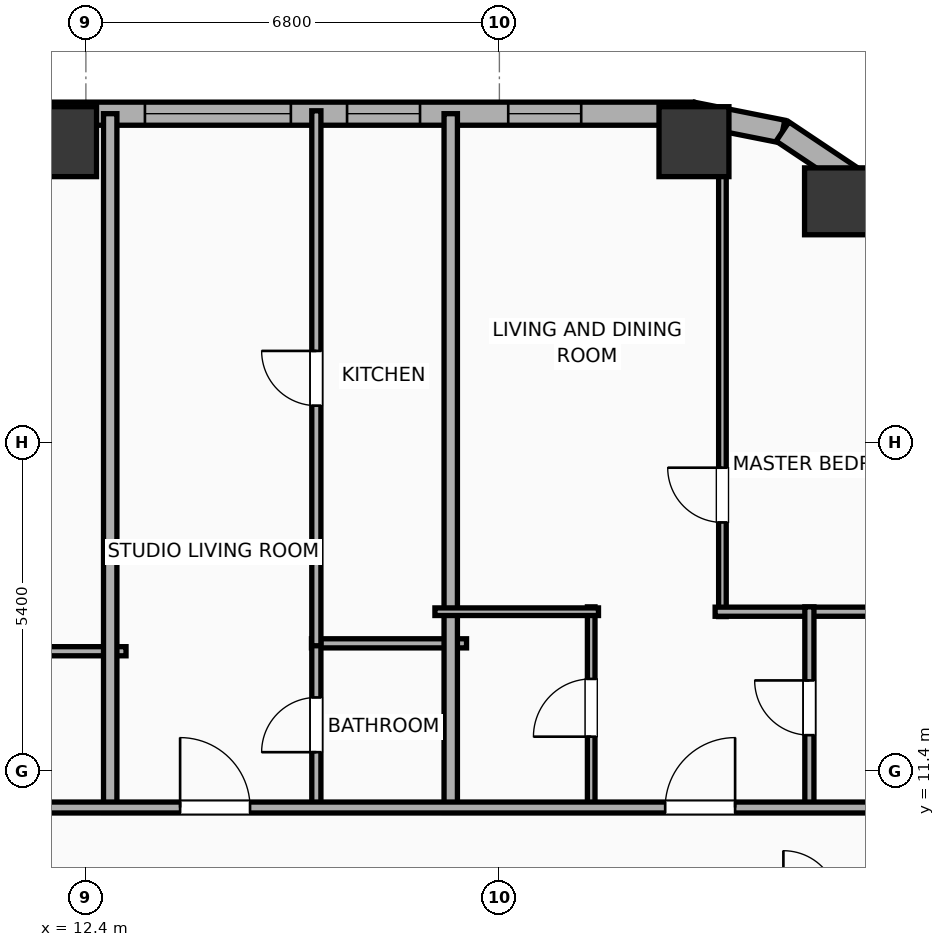
"""IFC4 building model, lengths in metres.
Left out: names, types, materials, properties, quantities, classifications, styles, units other than length and angle.
Written with IfcOpenShell. Run it as: python <this file> out.ifc"""

import sys

from ifc_helpers import new_model, si_unit, direction, frame, frame_2d, origin, origin_2d, place, context, subcontext, project, spatial, rectangle, hollow_rectangle, hollow_circle, extrude, element, fill, save


model = new_model("IFC4")
c1 = context("Model", 3, precision=1e-05, world=origin(), true_north=direction((0.0, 1.0)))
c2 = subcontext(c1, "Body", "Model", "MODEL_VIEW")
j1 = project(units=[si_unit("LENGTHUNIT", "METRE"), si_unit("PLANEANGLEUNIT", "RADIAN")], contexts=[c1])
p1 = place(None, origin())
s1 = spatial("IfcSite", under=j1, at=p1, CompositionType="ELEMENT")
p2 = place(p1, origin())
s2 = spatial("IfcBuilding", under=s1, at=p2, CompositionType="ELEMENT")
p3 = place(p2, frame((0.0, 0.0, 29.9)))
s3 = spatial("IfcBuildingStorey", under=s2, at=p3, CompositionType="ELEMENT", Elevation=29.9)
p4 = place(p3, frame((24.769, 20.769, 0.0), z_axis=(0.0, 0.0, 1.0), x_axis=(1.0, 0.0, 0.0)))
e1 = element("IfcColumn", 1, at=p4, inside=s3, PredefinedType="COLUMN", context=c2, shape_type="SweptSolid", body=[
    extrude(hollow_circle(Radius=0.55, WallThickness=0.036, at=origin_2d()), origin(), (0.0, 0.0, 1.0), 3.9),
])
for number, where, z_axis, x_axis in (
    (2, (22.4, 21.75, 0.0), (0.0, 0.0, 1.0), (1.0, 0.0, 0.0)),
    (3, (12.0, 21.75, 0.0), (0.0, 0.0, 1.0), (1.0, 0.0, 0.0)),
):
    element("IfcColumn", number, at=place(p3, frame(where, z_axis=z_axis, x_axis=x_axis)), inside=s3, PredefinedType="COLUMN", context=c2, shape_type="SweptSolid", body=[
        extrude(hollow_rectangle(XDim=1.15, YDim=1.15, WallThickness=0.04, at=origin_2d()), origin(), (0.0, 0.0, 1.0), 3.9),
    ])
p5 = place(p3, frame((-29.581, 22.21, 0.0), z_axis=(0.0, 0.0, 1.0), x_axis=(1.0, 0.0, 0.0)))
e4 = element("IfcWall", 4, at=p5, inside=s3, PredefinedType="ELEMENTEDWALL", context=c2, shape_type="SweptSolid", body=[
    extrude(rectangle(XDim=51.963, YDim=0.38, at=frame_2d((25.981, 0.0))), origin(), (0.0, 0.0, 1.0), 2.54),
])
p6 = place(p5, frame((5.81, 0.0, 0.75)))
e5 = element("IfcOpeningElement", 5, at=p6, cuts=e4, PredefinedType="OPENING", context=c2, shape_type="SweptSolid", body=[
    extrude(rectangle(XDim=2.4, YDim=1.63, at=frame_2d((1.2, 0.815))), frame((0.0, 0.2, 0.0), z_axis=(0.0, -1.0, 0.0), x_axis=(1.0, 0.0, 0.0)), (0.0, 0.0, 1.0), 0.4),
])
p7 = place(p5, frame((42.952, 0.0, 0.75)))
e6 = element("IfcOpeningElement", 6, at=p7, cuts=e4, PredefinedType="OPENING", context=c2, shape_type="SweptSolid", body=[
    extrude(rectangle(XDim=2.4, YDim=1.63, at=frame_2d((1.2, 0.815))), frame((0.0, 0.2, 0.0), z_axis=(0.0, -1.0, 0.0), x_axis=(1.0, 0.0, 0.0)), (0.0, 0.0, 1.0), 0.4),
])
p8 = place(p5, frame((1.436, 0.0, 0.75)))
e7 = element("IfcOpeningElement", 7, at=p8, cuts=e4, PredefinedType="OPENING", context=c2, shape_type="SweptSolid", body=[
    extrude(rectangle(XDim=1.2, YDim=1.63, at=frame_2d((0.6, 0.815))), frame((0.0, 0.2, 0.0), z_axis=(0.0, -1.0, 0.0), x_axis=(1.0, 0.0, 0.0)), (0.0, 0.0, 1.0), 0.4),
])
p9 = place(p5, frame((3.686, 0.0, 0.75)))
e8 = element("IfcOpeningElement", 8, at=p9, cuts=e4, PredefinedType="OPENING", context=c2, shape_type="SweptSolid", body=[
    extrude(rectangle(XDim=1.2, YDim=1.63, at=frame_2d((0.6, 0.815))), frame((0.0, 0.2, 0.0), z_axis=(0.0, -1.0, 0.0), x_axis=(1.0, 0.0, 0.0)), (0.0, 0.0, 1.0), 0.4),
])
p10 = place(p5, frame((11.221, 0.0, 0.75)))
e9 = element("IfcOpeningElement", 9, at=p10, cuts=e4, PredefinedType="OPENING", context=c2, shape_type="SweptSolid", body=[
    extrude(rectangle(XDim=1.2, YDim=1.63, at=frame_2d((0.6, 0.815))), frame((0.0, 0.2, 0.0), z_axis=(0.0, -1.0, 0.0), x_axis=(1.0, 0.0, 0.0)), (0.0, 0.0, 1.0), 0.4),
])
p11 = place(p5, frame((17.686, 0.0, 0.75)))
e10 = element("IfcOpeningElement", 10, at=p11, cuts=e4, PredefinedType="OPENING", context=c2, shape_type="SweptSolid", body=[
    extrude(rectangle(XDim=1.2, YDim=1.63, at=frame_2d((0.6, 0.815))), frame((0.0, 0.2, 0.0), z_axis=(0.0, -1.0, 0.0), x_axis=(1.0, 0.0, 0.0)), (0.0, 0.0, 1.0), 0.4),
])
p12 = place(p5, frame((14.886, 0.0, 0.75)))
e11 = element("IfcOpeningElement", 11, at=p12, cuts=e4, PredefinedType="OPENING", context=c2, shape_type="SweptSolid", body=[
    extrude(rectangle(XDim=1.2, YDim=1.63, at=frame_2d((0.6, 0.815))), frame((0.0, 0.2, 0.0), z_axis=(0.0, -1.0, 0.0), x_axis=(1.0, 0.0, 0.0)), (0.0, 0.0, 1.0), 0.4),
])
p13 = place(p5, frame((22.181, 0.0, 0.75)))
e12 = element("IfcOpeningElement", 12, at=p13, cuts=e4, PredefinedType="OPENING", context=c2, shape_type="SweptSolid", body=[
    extrude(rectangle(XDim=1.2, YDim=1.63, at=frame_2d((0.6, 0.815))), frame((0.0, 0.2, 0.0), z_axis=(0.0, -1.0, 0.0), x_axis=(1.0, 0.0, 0.0)), (0.0, 0.0, 1.0), 0.4),
])
p14 = place(p5, frame((28.926, 0.0, 0.75)))
e13 = element("IfcOpeningElement", 13, at=p14, cuts=e4, PredefinedType="OPENING", context=c2, shape_type="SweptSolid", body=[
    extrude(rectangle(XDim=1.2, YDim=1.63, at=frame_2d((0.6, 0.815))), frame((0.0, 0.2, 0.0), z_axis=(0.0, -1.0, 0.0), x_axis=(1.0, 0.0, 0.0)), (0.0, 0.0, 1.0), 0.4),
])
p15 = place(p5, frame((26.126, 0.0, 0.75)))
e14 = element("IfcOpeningElement", 14, at=p15, cuts=e4, PredefinedType="OPENING", context=c2, shape_type="SweptSolid", body=[
    extrude(rectangle(XDim=1.2, YDim=1.63, at=frame_2d((0.6, 0.815))), frame((0.0, 0.2, 0.0), z_axis=(0.0, -1.0, 0.0), x_axis=(1.0, 0.0, 0.0)), (0.0, 0.0, 1.0), 0.4),
])
p16 = place(p5, frame((32.276, 0.0, 0.75)))
e15 = element("IfcOpeningElement", 15, at=p16, cuts=e4, PredefinedType="OPENING", context=c2, shape_type="SweptSolid", body=[
    extrude(rectangle(XDim=1.2, YDim=1.63, at=frame_2d((0.6, 0.815))), frame((0.0, 0.2, 0.0), z_axis=(0.0, -1.0, 0.0), x_axis=(1.0, 0.0, 0.0)), (0.0, 0.0, 1.0), 0.4),
])
p17 = place(p5, frame((35.076, 0.0, 0.75)))
e16 = element("IfcOpeningElement", 16, at=p17, cuts=e4, PredefinedType="OPENING", context=c2, shape_type="SweptSolid", body=[
    extrude(rectangle(XDim=1.2, YDim=1.63, at=frame_2d((0.6, 0.815))), frame((0.0, 0.2, 0.0), z_axis=(0.0, -1.0, 0.0), x_axis=(1.0, 0.0, 0.0)), (0.0, 0.0, 1.0), 0.4),
])
p18 = place(p5, frame((38.981, 0.0, 0.75)))
e17 = element("IfcOpeningElement", 17, at=p18, cuts=e4, PredefinedType="OPENING", context=c2, shape_type="SweptSolid", body=[
    extrude(rectangle(XDim=1.2, YDim=1.63, at=frame_2d((0.6, 0.815))), frame((0.0, 0.2, 0.0), z_axis=(0.0, -1.0, 0.0), x_axis=(1.0, 0.0, 0.0)), (0.0, 0.0, 1.0), 0.4),
])
p19 = place(p5, frame((46.276, 0.0, 0.75)))
e18 = element("IfcOpeningElement", 18, at=p19, cuts=e4, PredefinedType="OPENING", context=c2, shape_type="SweptSolid", body=[
    extrude(rectangle(XDim=1.2, YDim=1.63, at=frame_2d((0.6, 0.815))), frame((0.0, 0.2, 0.0), z_axis=(0.0, -1.0, 0.0), x_axis=(1.0, 0.0, 0.0)), (0.0, 0.0, 1.0), 0.4),
])
p20 = place(p5, frame((48.927, 0.0, 0.75)))
e19 = element("IfcOpeningElement", 19, at=p20, cuts=e4, PredefinedType="OPENING", context=c2, shape_type="SweptSolid", body=[
    extrude(rectangle(XDim=1.2, YDim=1.63, at=frame_2d((0.6, 0.815))), frame((0.0, 0.2, 0.0), z_axis=(0.0, -1.0, 0.0), x_axis=(1.0, 0.0, 0.0)), (0.0, 0.0, 1.0), 0.4),
])
p21 = place(p3, frame((22.381, 22.21, 0.0), z_axis=(0.0, 0.0, 1.0), x_axis=(0.980786132421, -0.195086038585, 0.0)))
e20 = element("IfcWall", 20, at=p21, inside=s3, PredefinedType="ELEMENTEDWALL", context=c2, shape_type="SweptSolid", body=[
    extrude(rectangle(XDim=1.504, YDim=0.38, at=frame_2d((0.752, 0.0))), origin(), (0.0, 0.0, 1.0), 2.54),
])
p22 = place(p3, frame((23.857, 21.917, 0.0), z_axis=(0.0, 0.0, 1.0), x_axis=(0.831392092774, -0.555686231674, 0.0)))
e21 = element("IfcWall", 21, at=p22, inside=s3, PredefinedType="ELEMENTEDWALL", context=c2, shape_type="SweptSolid", body=[
    extrude(rectangle(XDim=1.485, YDim=0.38, at=frame_2d((0.743, 0.0))), origin(), (0.0, 0.0, 1.0), 2.54),
])
p23 = place(p3, frame((25.091, 21.091, 0.0), z_axis=(0.0, 0.0, 1.0), x_axis=(0.555686231674, -0.831392092774, 0.0)))
e22 = element("IfcWall", 22, at=p23, inside=s3, PredefinedType="ELEMENTEDWALL", context=c2, shape_type="SweptSolid", body=[
    extrude(rectangle(XDim=1.485, YDim=0.38, at=frame_2d((0.743, 0.0))), origin(), (0.0, 0.0, 1.0), 3.65),
])
p24 = place(p3, frame((10.817, 13.37, 0.0), z_axis=(0.0, 0.0, 1.0), x_axis=(1.0, 0.0, 0.0)))
e23 = element("IfcWall", 23, at=p24, inside=s3, PredefinedType="PLUMBINGWALL", context=c2, shape_type="SweptSolid", body=[
    extrude(rectangle(XDim=2.243, YDim=0.15, at=frame_2d((1.122, 0.0))), origin(), (0.0, 0.0, 1.0), 3.65),
])
p25 = place(p3, frame((12.8, 10.72, 0.0), z_axis=(0.0, 0.0, 1.0), x_axis=(0.0, 1.0, 0.0)))
e24 = element("IfcWall", 24, at=p25, inside=s3, PredefinedType="PARTITIONING", context=c2, shape_type="SweptSolid", body=[
    extrude(rectangle(XDim=11.49, YDim=0.22, at=frame_2d((5.745, 0.0))), origin(), (0.0, 0.0, 1.0), 2.54),
])
p26 = place(p3, frame((16.11, 13.5, 0.0), z_axis=(0.0, 0.0, 1.0), x_axis=(1.0, 0.0, 0.0)))
e25 = element("IfcWall", 25, at=p26, inside=s3, PredefinedType="PLUMBINGWALL", context=c2, shape_type="SweptSolid", body=[
    extrude(rectangle(XDim=2.55, YDim=0.15, at=frame_2d((1.275, 0.0))), origin(), (0.0, 0.0, 1.0), 3.65),
])
p27 = place(p3, frame((16.19, 10.78, 0.0), z_axis=(0.0, 0.0, 1.0), x_axis=(0.0, 1.0, 0.0)))
e26 = element("IfcWall", 26, at=p27, inside=s3, PredefinedType="PLUMBINGWALL", context=c2, shape_type="SweptSolid", body=[
    extrude(rectangle(XDim=2.76, YDim=0.15, at=frame_2d((1.38, 0.0))), origin(), (0.0, 0.0, 1.0), 3.65),
])
p28 = place(p27, frame((0.93, 0.0, 0.0)))
e27 = element("IfcOpeningElement", 27, at=p28, cuts=e26, PredefinedType="OPENING", context=c2, shape_type="SweptSolid", body=[
    extrude(rectangle(XDim=0.9, YDim=2.05, at=frame_2d((0.45, 1.025))), frame((0.0, 0.085, 0.0), z_axis=(0.0, -1.0, 0.0), x_axis=(1.0, 0.0, 0.0)), (0.0, 0.0, 1.0), 0.17),
])
p29 = place(p3, frame((16.19, 13.46, 0.0), z_axis=(0.0, 0.0, 1.0), x_axis=(0.0, 1.0, 0.0)))
e28 = element("IfcWall", 28, at=p29, inside=s3, PredefinedType="PLUMBINGWALL", context=c2, shape_type="SweptSolid", body=[
    extrude(rectangle(XDim=8.798, YDim=0.15, at=frame_2d((4.399, 0.0))), origin(), (0.0, 0.0, 1.0), 3.65),
])
p30 = place(p29, frame((3.949, 0.0, 0.0)))
e29 = element("IfcOpeningElement", 29, at=p30, cuts=e28, PredefinedType="OPENING", context=c2, shape_type="SweptSolid", body=[
    extrude(rectangle(XDim=0.9, YDim=2.05, at=frame_2d((0.45, 1.025))), frame((0.0, 0.085, 0.0), z_axis=(0.0, -1.0, 0.0), x_axis=(1.0, 0.0, 0.0)), (0.0, 0.0, 1.0), 0.17),
])
p31 = place(p3, frame((18.4, 10.72, 0.0), z_axis=(0.0, 0.0, 1.0), x_axis=(0.0, 1.0, 0.0)))
e30 = element("IfcWall", 30, at=p31, inside=s3, PredefinedType="PARTITIONING", context=c2, shape_type="SweptSolid", body=[
    extrude(rectangle(XDim=11.49, YDim=0.22, at=frame_2d((5.745, 0.0))), origin(), (0.0, 0.0, 1.0), 3.65),
])
p32 = place(p3, frame((22.868, 13.94, 0.0), z_axis=(0.0, 0.0, 1.0), x_axis=(0.0, 1.0, 0.0)))
e31 = element("IfcWall", 31, at=p32, inside=s3, PredefinedType="PARTITIONING", context=c2, shape_type="SweptSolid", body=[
    extrude(rectangle(XDim=8.326, YDim=0.125, at=frame_2d((4.163, 0.0))), origin(), (0.0, 0.0, 1.0), 2.54),
])
p33 = place(p32, frame((1.548, 0.0, 0.0)))
e32 = element("IfcOpeningElement", 32, at=p33, cuts=e31, PredefinedType="OPENING", context=c2, shape_type="SweptSolid", body=[
    extrude(rectangle(XDim=0.9, YDim=2.05, at=frame_2d((0.45, 1.025))), frame((0.0, 0.073, 0.0), z_axis=(0.0, -1.0, 0.0), x_axis=(1.0, 0.0, 0.0)), (0.0, 0.0, 1.0), 0.145),
])
p34 = place(p3, frame((22.748, 14.02, 0.0), z_axis=(0.0, 0.0, 1.0), x_axis=(1.0, 0.0, 0.0)))
e33 = element("IfcWall", 33, at=p34, inside=s3, PredefinedType="PLUMBINGWALL", context=c2, shape_type="SweptSolid", body=[
    extrude(rectangle(XDim=3.612, YDim=0.15, at=frame_2d((1.806, 0.0))), origin(), (0.0, 0.0, 1.0), 3.65),
])
p35 = place(p3, frame((20.71, 10.78, 0.0), z_axis=(0.0, 0.0, 1.0), x_axis=(0.0, 1.0, 0.0)))
e34 = element("IfcWall", 34, at=p35, inside=s3, PredefinedType="PARTITIONING", context=c2, shape_type="SweptSolid", body=[
    extrude(rectangle(XDim=3.32, YDim=0.125, at=frame_2d((1.66, 0.0))), origin(), (0.0, 0.0, 1.0), 2.54),
])
p36 = place(p35, frame((1.185, 0.0, 0.0)))
e35 = element("IfcOpeningElement", 35, at=p36, cuts=e34, PredefinedType="OPENING", context=c2, shape_type="SweptSolid", body=[
    extrude(rectangle(XDim=0.95, YDim=2.05, at=frame_2d((0.475, 1.025))), frame((0.0, 0.073, 0.0), z_axis=(0.0, -1.0, 0.0), x_axis=(1.0, 0.0, 0.0)), (0.0, 0.0, 1.0), 0.145),
])
p37 = place(p3, frame((18.14, 14.02, 0.0), z_axis=(0.0, 0.0, 1.0), x_axis=(1.0, 0.0, 0.0)))
e36 = element("IfcWall", 36, at=p37, inside=s3, PredefinedType="PARTITIONING", context=c2, shape_type="SweptSolid", body=[
    extrude(rectangle(XDim=2.69, YDim=0.125, at=frame_2d((1.345, 0.0))), origin(), (0.0, 0.0, 1.0), 3.65),
])
p38 = place(p3, frame((24.298, 10.78, 0.0), z_axis=(0.0, 0.0, 1.0), x_axis=(0.0, 1.0, 0.0)))
e37 = element("IfcWall", 37, at=p38, inside=s3, PredefinedType="PLUMBINGWALL", context=c2, shape_type="SweptSolid", body=[
    extrude(rectangle(XDim=3.32, YDim=0.15, at=frame_2d((1.66, 0.0))), origin(), (0.0, 0.0, 1.0), 3.65),
])
p39 = place(p38, frame((1.21, 0.0, 0.0)))
e38 = element("IfcOpeningElement", 38, at=p39, cuts=e37, PredefinedType="OPENING", context=c2, shape_type="SweptSolid", body=[
    extrude(rectangle(XDim=0.9, YDim=2.05, at=frame_2d((0.45, 1.025))), frame((0.0, 0.085, 0.0), z_axis=(0.0, -1.0, 0.0), x_axis=(1.0, 0.0, 0.0)), (0.0, 0.0, 1.0), 0.17),
])
p40 = place(p3, frame((-33.41, 10.8, 0.0), z_axis=(0.0, 0.0, 1.0), x_axis=(1.0, 0.0, 0.0)))
e39 = element("IfcWall", 39, at=p40, inside=s3, PredefinedType="PARTITIONING", context=c2, shape_type="SweptSolid", body=[
    extrude(rectangle(XDim=59.62, YDim=0.18, at=frame_2d((29.81, 0.0))), origin(), (0.0, 0.0, 1.0), 3.65),
])
p41 = place(p40, frame((3.062, 0.0, 0.0)))
e40 = element("IfcOpeningElement", 40, at=p41, cuts=e39, PredefinedType="OPENING", context=c2, shape_type="SweptSolid", body=[
    extrude(rectangle(XDim=1.15, YDim=2.05, at=frame_2d((0.575, 1.025))), frame((0.0, 0.1, 0.0), z_axis=(0.0, -1.0, 0.0), x_axis=(1.0, 0.0, 0.0)), (0.0, 0.0, 1.0), 0.2),
])
p42 = place(p40, frame((10.312, 0.0, 0.0)))
e41 = element("IfcOpeningElement", 41, at=p42, cuts=e39, PredefinedType="OPENING", context=c2, shape_type="SweptSolid", body=[
    extrude(rectangle(XDim=1.15, YDim=2.05, at=frame_2d((0.575, 1.025))), frame((0.0, 0.1, 0.0), z_axis=(0.0, -1.0, 0.0), x_axis=(1.0, 0.0, 0.0)), (0.0, 0.0, 1.0), 0.2),
])
p43 = place(p40, frame((15.153, 0.0, 0.0)))
e42 = element("IfcOpeningElement", 42, at=p43, cuts=e39, PredefinedType="OPENING", context=c2, shape_type="SweptSolid", body=[
    extrude(rectangle(XDim=0.9, YDim=2.05, at=frame_2d((0.45, 1.025))), frame((0.0, 0.1, 0.0), z_axis=(0.0, -1.0, 0.0), x_axis=(1.0, 0.0, 0.0)), (0.0, 0.0, 1.0), 0.2),
])
p44 = place(p40, frame((21.508, 0.0, 0.0)))
e43 = element("IfcOpeningElement", 43, at=p44, cuts=e39, PredefinedType="OPENING", context=c2, shape_type="SweptSolid", body=[
    extrude(rectangle(XDim=1.15, YDim=2.05, at=frame_2d((0.575, 1.025))), frame((0.0, 0.1, 0.0), z_axis=(0.0, -1.0, 0.0), x_axis=(1.0, 0.0, 0.0)), (0.0, 0.0, 1.0), 0.2),
])
p45 = place(p40, frame((26.355, 0.0, 0.0)))
e44 = element("IfcOpeningElement", 44, at=p45, cuts=e39, PredefinedType="OPENING", context=c2, shape_type="SweptSolid", body=[
    extrude(rectangle(XDim=0.9, YDim=2.05, at=frame_2d((0.45, 1.025))), frame((0.0, 0.1, 0.0), z_axis=(0.0, -1.0, 0.0), x_axis=(1.0, 0.0, 0.0)), (0.0, 0.0, 1.0), 0.2),
])
p46 = place(p40, frame((32.753, 0.0, 0.0)))
e45 = element("IfcOpeningElement", 45, at=p46, cuts=e39, PredefinedType="OPENING", context=c2, shape_type="SweptSolid", body=[
    extrude(rectangle(XDim=1.15, YDim=2.05, at=frame_2d((0.575, 1.025))), frame((0.0, 0.1, 0.0), z_axis=(0.0, -1.0, 0.0), x_axis=(1.0, 0.0, 0.0)), (0.0, 0.0, 1.0), 0.2),
])
p47 = place(p40, frame((36.163, 0.0, 0.0)))
e46 = element("IfcOpeningElement", 46, at=p47, cuts=e39, PredefinedType="OPENING", context=c2, shape_type="SweptSolid", body=[
    extrude(rectangle(XDim=1.15, YDim=2.05, at=frame_2d((0.575, 1.025))), frame((0.0, 0.1, 0.0), z_axis=(0.0, -1.0, 0.0), x_axis=(1.0, 0.0, 0.0)), (0.0, 0.0, 1.0), 0.2),
])
p48 = place(p40, frame((43.156, 0.0, 0.0)))
e47 = element("IfcOpeningElement", 47, at=p48, cuts=e39, PredefinedType="OPENING", context=c2, shape_type="SweptSolid", body=[
    extrude(rectangle(XDim=0.9, YDim=2.05, at=frame_2d((0.45, 1.025))), frame((0.0, 0.1, 0.0), z_axis=(0.0, -1.0, 0.0), x_axis=(1.0, 0.0, 0.0)), (0.0, 0.0, 1.0), 0.2),
])
p49 = place(p40, frame((47.36, 0.0, 0.0)))
e48 = element("IfcOpeningElement", 48, at=p49, cuts=e39, PredefinedType="OPENING", context=c2, shape_type="SweptSolid", body=[
    extrude(rectangle(XDim=1.15, YDim=2.05, at=frame_2d((0.575, 1.025))), frame((0.0, 0.1, 0.0), z_axis=(0.0, -1.0, 0.0), x_axis=(1.0, 0.0, 0.0)), (0.0, 0.0, 1.0), 0.2),
])
p50 = place(p40, frame((55.337, 0.0, 0.0)))
e49 = element("IfcOpeningElement", 49, at=p50, cuts=e39, PredefinedType="OPENING", context=c2, shape_type="SweptSolid", body=[
    extrude(rectangle(XDim=1.15, YDim=2.05, at=frame_2d((0.575, 1.025))), frame((0.0, 0.1, 0.0), z_axis=(0.0, -1.0, 0.0), x_axis=(1.0, 0.0, 0.0)), (0.0, 0.0, 1.0), 0.2),
])
p51 = place(p7, origin())
e50 = element("IfcWindow", 50, at=p51, inside=s3, PartitioningType="SINGLE_PANEL", PredefinedType="WINDOW", context=c2, shape_type="SweptSolid", body=[
    extrude(rectangle(XDim=2.4, YDim=1.63, at=frame_2d((1.2, 0.815))), frame((0.0, 0.03, 0.0), z_axis=(0.0, -1.0, 0.0), x_axis=(1.0, 0.0, 0.0)), (0.0, 0.0, 1.0), 0.06),
])
fill(e6, e50)
p52 = place(p19, origin())
e51 = element("IfcWindow", 51, at=p52, inside=s3, PartitioningType="SINGLE_PANEL", PredefinedType="WINDOW", context=c2, shape_type="SweptSolid", body=[
    extrude(rectangle(XDim=1.2, YDim=1.63, at=frame_2d((0.6, 0.815))), frame((0.0, 0.03, 0.0), z_axis=(0.0, -1.0, 0.0), x_axis=(1.0, 0.0, 0.0)), (0.0, 0.0, 1.0), 0.06),
])
fill(e18, e51)
p53 = place(p20, origin())
e52 = element("IfcWindow", 52, at=p53, inside=s3, PartitioningType="SINGLE_PANEL", PredefinedType="WINDOW", context=c2, shape_type="SweptSolid", body=[
    extrude(rectangle(XDim=1.2, YDim=1.63, at=frame_2d((0.6, 0.815))), frame((0.0, 0.03, 0.0), z_axis=(0.0, -1.0, 0.0), x_axis=(1.0, 0.0, 0.0)), (0.0, 0.0, 1.0), 0.06),
])
fill(e19, e52)
p54 = place(p28, origin())
e53 = element("IfcDoor", 53, at=p54, inside=s3, OperationType="SINGLE_SWING_LEFT", PredefinedType="DOOR", context=c2, shape_type="SweptSolid", body=[
    extrude(rectangle(XDim=0.9, YDim=2.05, at=frame_2d((0.45, 1.025))), frame((0.0, 0.025, 0.0), z_axis=(0.0, -1.0, 0.0), x_axis=(1.0, 0.0, 0.0)), (0.0, 0.0, 1.0), 0.05),
])
fill(e27, e53)
p55 = place(p30, origin())
e54 = element("IfcDoor", 54, at=p55, inside=s3, OperationType="SINGLE_SWING_RIGHT", PredefinedType="DOOR", context=c2, shape_type="SweptSolid", body=[
    extrude(rectangle(XDim=0.9, YDim=2.05, at=frame_2d((0.45, 1.025))), frame((0.0, 0.025, 0.0), z_axis=(0.0, -1.0, 0.0), x_axis=(1.0, 0.0, 0.0)), (0.0, 0.0, 1.0), 0.05),
])
fill(e29, e54)
p56 = place(p33, origin())
e55 = element("IfcDoor", 55, at=p56, inside=s3, OperationType="SINGLE_SWING_RIGHT", PredefinedType="DOOR", context=c2, shape_type="SweptSolid", body=[
    extrude(rectangle(XDim=0.9, YDim=2.05, at=frame_2d((0.45, 1.025))), frame((0.0, 0.025, 0.0), z_axis=(0.0, -1.0, 0.0), x_axis=(1.0, 0.0, 0.0)), (0.0, 0.0, 1.0), 0.05),
])
fill(e32, e55)
p57 = place(p36, origin())
e56 = element("IfcDoor", 56, at=p57, inside=s3, OperationType="SINGLE_SWING_LEFT", PredefinedType="DOOR", context=c2, shape_type="SweptSolid", body=[
    extrude(rectangle(XDim=0.95, YDim=2.05, at=frame_2d((0.475, 1.025))), frame((0.0, 0.025, 0.0), z_axis=(0.0, -1.0, 0.0), x_axis=(1.0, 0.0, 0.0)), (0.0, 0.0, 1.0), 0.05),
])
fill(e35, e56)
p58 = place(p39, origin())
e57 = element("IfcDoor", 57, at=p58, inside=s3, OperationType="SINGLE_SWING_RIGHT", PredefinedType="DOOR", context=c2, shape_type="SweptSolid", body=[
    extrude(rectangle(XDim=0.9, YDim=2.05, at=frame_2d((0.45, 1.025))), frame((0.0, 0.025, 0.0), z_axis=(0.0, -1.0, 0.0), x_axis=(1.0, 0.0, 0.0)), (0.0, 0.0, 1.0), 0.05),
])
fill(e38, e57)
p59 = place(p49, origin())
e58 = element("IfcDoor", 58, at=p59, inside=s3, OperationType="SINGLE_SWING_LEFT", PredefinedType="DOOR", context=c2, shape_type="SweptSolid", body=[
    extrude(rectangle(XDim=1.15, YDim=2.05, at=frame_2d((0.575, 1.025))), frame((0.0, 0.025, 0.0), z_axis=(0.0, -1.0, 0.0), x_axis=(1.0, 0.0, 0.0)), (0.0, 0.0, 1.0), 0.05),
])
fill(e48, e58)
p60 = place(p50, origin())
e59 = element("IfcDoor", 59, at=p60, inside=s3, OperationType="SINGLE_SWING_RIGHT", PredefinedType="DOOR", context=c2, shape_type="SweptSolid", body=[
    extrude(rectangle(XDim=1.15, YDim=2.05, at=frame_2d((0.575, 1.025))), frame((0.0, 0.025, 0.0), z_axis=(0.0, -1.0, 0.0), x_axis=(1.0, 0.0, 0.0)), (0.0, 0.0, 1.0), 0.05),
])
fill(e49, e59)
save(model, sys.argv[1])
